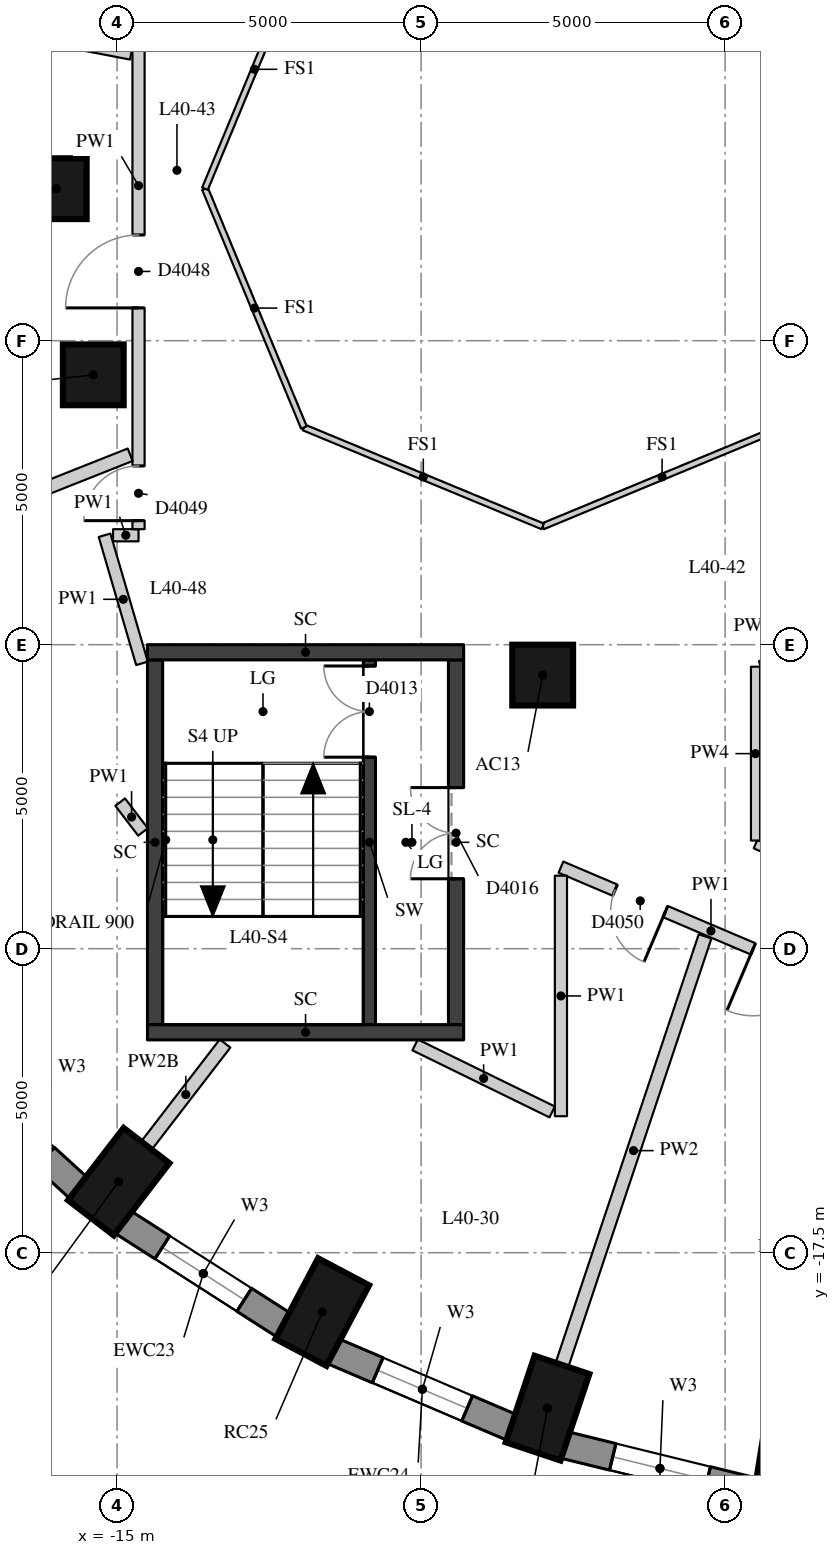
"""IFC4 building model, lengths in metres.
Left out: names, types, materials, properties, quantities, classifications, styles, units other than length and angle.
Written with IfcOpenShell. Run it as: python <this file> out.ifc"""

import sys

from ifc_helpers import new_model, si_unit, direction, frame, frame_2d, origin, origin_2d, place, context, subcontext, project, spatial, rectangle, extrude, element, fill, save


model = new_model("IFC4")
c1 = context("Model", 3, precision=1e-05, world=origin(), true_north=direction((0.0, 1.0)))
c2 = subcontext(c1, "Body", "Model", "MODEL_VIEW")
j1 = project(units=[si_unit("LENGTHUNIT", "METRE"), si_unit("PLANEANGLEUNIT", "RADIAN")], contexts=[c1])
p1 = place(None, origin())
s1 = spatial("IfcSite", under=j1, at=p1, CompositionType="ELEMENT")
p2 = place(p1, origin())
s2 = spatial("IfcBuilding", under=s1, at=p2, CompositionType="ELEMENT")
p3 = place(p2, frame((0.0, 0.0, 145.1)))
s3 = spatial("IfcBuildingStorey", under=s2, at=p3, CompositionType="ELEMENT", Elevation=145.1)
for number, where, z_axis, x_axis in (
    (1, (-14.973, -16.332, 0.0), (0.0, 0.0, 1.0), (-0.61, -0.792, 0.0)),
    (2, (-11.625, -18.476, 0.0), (0.0, 0.0, 1.0), (-0.468, -0.884, 0.0)),
    (3, (-7.92, -20.056, 0.0), (0.0, 0.0, 1.0), (-0.317, -0.949, 0.0)),
    (4, (-3.972, -21.024, 0.0), (0.0, 0.0, 1.0), (-0.16, -0.987, 0.0)),
):
    element("IfcColumn", number, at=place(p3, frame(where, z_axis=z_axis, x_axis=x_axis)), inside=s3, PredefinedType="COLUMN", context=c2, shape_type="SweptSolid", body=[
        extrude(rectangle(XDim=1.5, YDim=0.95, at=origin_2d()), origin(), (0.0, 0.0, 1.0), 3.3),
    ])
for number, where, z_axis, x_axis in (
    (5, (-16.0, 0.0, 0.0), (0.0, 0.0, 1.0), (1.0, 0.0, 0.0)),
    (6, (-15.391, -3.062, 0.0), (0.0, 0.0, 1.0), (1.0, 0.0, 0.0)),
    (7, (-8.0, -8.0, 0.0), (0.0, 0.0, 1.0), (1.0, 0.0, 0.0)),
):
    element("IfcColumn", number, at=place(p3, frame(where, z_axis=z_axis, x_axis=x_axis)), inside=s3, PredefinedType="COLUMN", context=c2, shape_type="SweptSolid", body=[
        extrude(rectangle(XDim=1.0, YDim=1.0, at=origin_2d()), origin(), (0.0, 0.0, 1.0), 3.3),
    ])
p4 = place(p3, frame((-17.913, -14.35, 0.0), z_axis=(0.0, 0.0, 1.0), x_axis=(0.737808755941, -0.675009807082, 0.0)))
e8 = element("IfcWall", 8, at=p4, inside=s3, PredefinedType="SOLIDWALL", context=c2, shape_type="SweptSolid", body=[
    extrude(rectangle(XDim=3.094, YDim=0.45, at=frame_2d((1.547, 0.0))), origin(), (0.0, 0.0, 1.0), 3.02),
])
p5 = place(p4, frame((0.747, 0.0, 0.4)))
e9 = element("IfcOpeningElement", 9, at=p5, cuts=e8, PredefinedType="OPENING", context=c2, shape_type="SweptSolid", body=[
    extrude(rectangle(XDim=1.6, YDim=1.75, at=frame_2d((0.8, 0.875))), frame((0.0, 0.235, 0.0), z_axis=(0.0, -1.0, 0.0), x_axis=(1.0, 0.0, 0.0)), (0.0, 0.0, 1.0), 0.47),
])
p6 = place(p3, frame((-14.908, -16.993, 0.0), z_axis=(0.0, 0.0, 1.0), x_axis=(0.842065914439, -0.539374633943, 0.0)))
e10 = element("IfcWall", 10, at=p6, inside=s3, PredefinedType="SOLIDWALL", context=c2, shape_type="SweptSolid", body=[
    extrude(rectangle(XDim=3.151, YDim=0.45, at=frame_2d((1.576, 0.0))), origin(), (0.0, 0.0, 1.0), 3.02),
])
p7 = place(p6, frame((0.776, 0.0, 0.4)))
e11 = element("IfcOpeningElement", 11, at=p7, cuts=e10, PredefinedType="OPENING", context=c2, shape_type="SweptSolid", body=[
    extrude(rectangle(XDim=1.6, YDim=1.75, at=frame_2d((0.8, 0.875))), frame((0.0, 0.235, 0.0), z_axis=(0.0, -1.0, 0.0), x_axis=(1.0, 0.0, 0.0)), (0.0, 0.0, 1.0), 0.47),
])
p8 = place(p3, frame((-11.45, -19.119, 0.0), z_axis=(0.0, 0.0, 1.0), x_axis=(0.919798725687, -0.392390499663, 0.0)))
e12 = element("IfcWall", 12, at=p8, inside=s3, PredefinedType="SOLIDWALL", context=c2, shape_type="SweptSolid", body=[
    extrude(rectangle(XDim=3.2, YDim=0.45, at=frame_2d((1.6, 0.0))), origin(), (0.0, 0.0, 1.0), 3.02),
])
p9 = place(p8, frame((0.8, 0.0, 0.4)))
e13 = element("IfcOpeningElement", 13, at=p9, cuts=e12, PredefinedType="OPENING", context=c2, shape_type="SweptSolid", body=[
    extrude(rectangle(XDim=1.6, YDim=1.75, at=frame_2d((0.8, 0.875))), frame((0.0, 0.235, 0.0), z_axis=(0.0, -1.0, 0.0), x_axis=(1.0, 0.0, 0.0)), (0.0, 0.0, 1.0), 0.47),
])
p10 = place(p3, frame((-7.643, -20.662, 0.0), z_axis=(0.0, 0.0, 1.0), x_axis=(0.971232901476, -0.238131583563, 0.0)))
e14 = element("IfcWall", 14, at=p10, inside=s3, PredefinedType="SOLIDWALL", context=c2, shape_type="SweptSolid", body=[
    extrude(rectangle(XDim=3.237, YDim=0.45, at=frame_2d((1.618, 0.0))), origin(), (0.0, 0.0, 1.0), 3.02),
])
p11 = place(p10, frame((0.818, 0.0, 0.4)))
e15 = element("IfcOpeningElement", 15, at=p11, cuts=e14, PredefinedType="OPENING", context=c2, shape_type="SweptSolid", body=[
    extrude(rectangle(XDim=1.6, YDim=1.75, at=frame_2d((0.8, 0.875))), frame((0.0, 0.235, 0.0), z_axis=(0.0, -1.0, 0.0), x_axis=(1.0, 0.0, 0.0)), (0.0, 0.0, 1.0), 0.47),
])
p12 = place(p3, frame((-10.85, -13.75, 0.0), z_axis=(0.0, 0.0, 1.0), x_axis=(0.0, 1.0, 0.0)))
e16 = element("IfcWall", 16, at=p12, inside=s3, PredefinedType="SHEAR", context=c2, shape_type="SweptSolid", body=[
    extrude(rectangle(XDim=6.0, YDim=0.2, at=frame_2d((3.0, 0.0))), origin(), (0.0, 0.0, 1.0), 3.02),
])
p13 = place(p12, frame((4.4, 0.0, 0.0)))
e17 = element("IfcOpeningElement", 17, at=p13, cuts=e16, PredefinedType="OPENING", context=c2, shape_type="SweptSolid", body=[
    extrude(rectangle(XDim=1.5, YDim=2.1, at=frame_2d((0.75, 1.05))), frame((0.0, 0.11, 0.0), z_axis=(0.0, -1.0, 0.0), x_axis=(1.0, 0.0, 0.0)), (0.0, 0.0, 1.0), 0.22),
])
p14 = place(p3, frame((-14.375, -13.75, -0.28), z_axis=(0.0, 0.0, 1.0), x_axis=(0.0, 1.0, 0.0)))
e18 = element("IfcWall", 18, at=p14, inside=s3, PredefinedType="SHEAR", context=c2, shape_type="SweptSolid", body=[
    extrude(rectangle(XDim=6.0, YDim=0.25, at=frame_2d((3.0, 0.0))), origin(), (0.0, 0.0, 1.0), 3.3),
])
p15 = place(p3, frame((-9.425, -13.75, -0.28), z_axis=(0.0, 0.0, 1.0), x_axis=(0.0, 1.0, 0.0)))
e19 = element("IfcWall", 19, at=p15, inside=s3, PredefinedType="SHEAR", context=c2, shape_type="SweptSolid", body=[
    extrude(rectangle(XDim=6.0, YDim=0.25, at=frame_2d((3.0, 0.0))), origin(), (0.0, 0.0, 1.0), 3.3),
])
p16 = place(p15, frame((2.4, 0.0, 0.28)))
e20 = element("IfcOpeningElement", 20, at=p16, cuts=e19, PredefinedType="OPENING", context=c2, shape_type="SweptSolid", body=[
    extrude(rectangle(XDim=1.5, YDim=2.1, at=frame_2d((0.75, 1.05))), frame((0.0, 0.135, 0.0), z_axis=(0.0, -1.0, 0.0), x_axis=(1.0, 0.0, 0.0)), (0.0, 0.0, 1.0), 0.27),
])
for number, where, z_axis, x_axis in (
    (21, (-14.5, -7.625, -0.28), (0.0, 0.0, 1.0), (1.0, 0.0, 0.0)),
    (22, (-14.5, -13.875, -0.28), (0.0, 0.0, 1.0), (1.0, 0.0, 0.0)),
):
    element("IfcWall", number, at=place(p3, frame(where, z_axis=z_axis, x_axis=x_axis)), inside=s3, PredefinedType="SHEAR", context=c2, shape_type="SweptSolid", body=[
        extrude(rectangle(XDim=5.2, YDim=0.25, at=frame_2d((2.6, 0.0))), origin(), (0.0, 0.0, 1.0), 3.3),
    ])
p17 = place(p3, frame((-2.766, -13.258, 0.0), z_axis=(0.0, 0.0, 1.0), x_axis=(-0.920210819037, 0.391423106787, 0.0)))
e23 = element("IfcWall", 23, at=p17, inside=s3, PredefinedType="PARTITIONING", context=c2, shape_type="SweptSolid", body=[
    extrude(rectangle(XDim=5.362, YDim=0.2, at=frame_2d((2.681, 0.0))), origin(), (0.0, 0.0, 1.0), 3.02),
])
p18 = place(p17, frame((3.495, 0.0, 0.0)))
e24 = element("IfcOpeningElement", 24, at=p18, cuts=e23, PredefinedType="OPENING", context=c2, shape_type="SweptSolid", body=[
    extrude(rectangle(XDim=0.9, YDim=2.1, at=frame_2d((0.45, 1.05))), frame((0.0, 0.11, 0.0), z_axis=(0.0, -1.0, 0.0), x_axis=(1.0, 0.0, 0.0)), (0.0, 0.0, 1.0), 0.22),
])
p19 = place(p17, frame((0.827, 0.0, 0.0)))
e25 = element("IfcOpeningElement", 25, at=p19, cuts=e23, PredefinedType="OPENING", context=c2, shape_type="SweptSolid", body=[
    extrude(rectangle(XDim=1.1, YDim=2.1, at=frame_2d((0.55, 1.05))), frame((0.0, 0.11, 0.0), z_axis=(0.0, -1.0, 0.0), x_axis=(1.0, 0.0, 0.0)), (0.0, 0.0, 1.0), 0.22),
])
p20 = place(p3, frame((-7.7, -11.299, 0.0), z_axis=(0.0, 0.0, 1.0), x_axis=(0.0, -1.0, 0.0)))
e26 = element("IfcWall", 26, at=p20, inside=s3, PredefinedType="PARTITIONING", context=c2, shape_type="SweptSolid", body=[
    extrude(rectangle(XDim=3.956, YDim=0.2, at=frame_2d((1.978, 0.0))), origin(), (0.0, 0.0, 1.0), 3.02),
])
p21 = place(p3, frame((-7.844, -15.185, 0.0), z_axis=(0.0, 0.0, 1.0), x_axis=(-0.898266579534, 0.439450966653, 0.0)))
e27 = element("IfcWall", 27, at=p21, inside=s3, PredefinedType="PARTITIONING", context=c2, shape_type="SweptSolid", body=[
    extrude(rectangle(XDim=2.509, YDim=0.2, at=frame_2d((1.254, 0.0))), origin(), (0.0, 0.0, 1.0), 3.02),
])
p22 = place(p3, frame((-14.574, -10.58, 0.0), z_axis=(0.0, 0.0, 1.0), x_axis=(-0.606745625174, 0.794896060081, 0.0)))
e28 = element("IfcWall", 28, at=p22, inside=s3, PredefinedType="PARTITIONING", context=c2, shape_type="SweptSolid", body=[
    extrude(rectangle(XDim=0.618, YDim=0.2, at=frame_2d((0.309, 0.0))), origin(), (0.0, 0.0, 1.0), 3.02),
])
p23 = place(p3, frame((-14.59, -7.807, 0.0), z_axis=(0.0, 0.0, 1.0), x_axis=(-0.280401457903, 0.959882817018, 0.0)))
e29 = element("IfcWall", 29, at=p23, inside=s3, PredefinedType="PARTITIONING", context=c2, shape_type="SweptSolid", body=[
    extrude(rectangle(XDim=2.195, YDim=0.2, at=frame_2d((1.098, 0.0))), origin(), (0.0, 0.0, 1.0), 3.02),
])
p24 = place(p3, frame((-15.065, -5.7, 0.0), z_axis=(0.0, 0.0, 1.0), x_axis=(1.0, 0.0, 0.0)))
e30 = element("IfcWall", 30, at=p24, inside=s3, PredefinedType="PARTITIONING", context=c2, shape_type="SweptSolid", body=[
    extrude(rectangle(XDim=0.419, YDim=0.2, at=frame_2d((0.209, 0.0))), origin(), (0.0, 0.0, 1.0), 3.02),
])
p25 = place(p3, frame((-14.647, -5.6, 0.0), z_axis=(0.0, 0.0, 1.0), x_axis=(0.0, 1.0, 0.0)))
e31 = element("IfcWall", 31, at=p25, inside=s3, PredefinedType="PARTITIONING", context=c2, shape_type="SweptSolid", body=[
    extrude(rectangle(XDim=11.3, YDim=0.2, at=frame_2d((5.65, 0.0))), origin(), (0.0, 0.0, 1.0), 3.02),
])
p26 = place(p25, frame((10.06, 0.0, 0.0)))
e32 = element("IfcOpeningElement", 32, at=p26, cuts=e31, PredefinedType="OPENING", context=c2, shape_type="SweptSolid", body=[
    extrude(rectangle(XDim=1.1, YDim=2.1, at=frame_2d((0.55, 1.05))), frame((0.0, 0.11, 0.0), z_axis=(0.0, -1.0, 0.0), x_axis=(1.0, 0.0, 0.0)), (0.0, 0.0, 1.0), 0.22),
])
p27 = place(p25, frame((3.639, 0.0, 0.0)))
e33 = element("IfcOpeningElement", 33, at=p27, cuts=e31, PredefinedType="OPENING", context=c2, shape_type="SweptSolid", body=[
    extrude(rectangle(XDim=1.2, YDim=2.1, at=frame_2d((0.6, 1.05))), frame((0.0, 0.11, 0.0), z_axis=(0.0, -1.0, 0.0), x_axis=(1.0, 0.0, 0.0)), (0.0, 0.0, 1.0), 0.22),
])
p28 = place(p25, frame((0.14, 0.0, 0.0)))
e34 = element("IfcOpeningElement", 34, at=p28, cuts=e31, PredefinedType="OPENING", context=c2, shape_type="SweptSolid", body=[
    extrude(rectangle(XDim=0.9, YDim=2.1, at=frame_2d((0.45, 1.05))), frame((0.0, 0.11, 0.0), z_axis=(0.0, -1.0, 0.0), x_axis=(1.0, 0.0, 0.0)), (0.0, 0.0, 1.0), 0.22),
])
p29 = place(p3, frame((-2.501, -11.631, 0.0), z_axis=(0.0, 0.0, 1.0), x_axis=(-0.920228720371, 0.391381019217, 0.0)))
e35 = element("IfcWall", 35, at=p29, inside=s3, PredefinedType="PARTITIONING", context=c2, shape_type="SweptSolid", body=[
    extrude(rectangle(XDim=2.172, YDim=0.15, at=frame_2d((1.086, 0.0))), origin(), (0.0, 0.0, 1.0), 3.02),
])
p30 = place(p3, frame((-4.5, -10.721, 0.0), z_axis=(0.0, 0.0, 1.0), x_axis=(0.0, 1.0, 0.0)))
e36 = element("IfcWall", 36, at=p30, inside=s3, PredefinedType="PARTITIONING", context=c2, shape_type="SweptSolid", body=[
    extrude(rectangle(XDim=2.859, YDim=0.15, at=frame_2d((1.43, 0.0))), origin(), (0.0, 0.0, 1.0), 3.02),
])
p31 = place(p3, frame((-4.423, -7.842, 0.0), z_axis=(0.0, 0.0, 1.0), x_axis=(0.965853333569, 0.259089440221, 0.0)))
e37 = element("IfcWall", 37, at=p31, inside=s3, PredefinedType="PARTITIONING", context=c2, shape_type="SweptSolid", body=[
    extrude(rectangle(XDim=0.852, YDim=0.15, at=frame_2d((0.426, 0.0))), origin(), (0.0, 0.0, 1.0), 3.02),
])
p32 = place(p3, frame((-20.932, 3.417, 0.0), z_axis=(0.0, 0.0, 1.0), x_axis=(0.982023362662, -0.188759410856, 0.0)))
e38 = element("IfcWall", 38, at=p32, inside=s3, PredefinedType="PARTITIONING", context=c2, shape_type="SweptSolid", body=[
    extrude(rectangle(XDim=6.278, YDim=0.22, at=frame_2d((3.139, 0.0))), origin(), (0.0, 0.0, 1.0), 2.57),
])
p33 = place(p3, frame((-19.99, -6.441, 0.0), z_axis=(0.0, 0.0, 1.0), x_axis=(0.929507316491, 0.368803672147, 0.0)))
e39 = element("IfcWall", 39, at=p33, inside=s3, PredefinedType="PARTITIONING", context=c2, shape_type="SweptSolid", body=[
    extrude(rectangle(XDim=5.6, YDim=0.22, at=frame_2d((2.8, 0.0))), origin(), (0.0, 0.0, 1.0), 3.02),
])
p34 = place(p3, frame((-14.516, -15.737, 0.0), z_axis=(0.0, 0.0, 1.0), x_axis=(0.609983624648, 0.792414019097, 0.0)))
e40 = element("IfcWall", 40, at=p34, inside=s3, PredefinedType="PARTITIONING", context=c2, shape_type="SweptSolid", body=[
    extrude(rectangle(XDim=2.118, YDim=0.22, at=frame_2d((1.059, 0.0))), origin(), (0.0, 0.0, 1.0), 2.57),
])
p35 = place(p3, frame((-7.683, -19.345, 0.0), z_axis=(0.0, 0.0, 1.0), x_axis=(0.316720596973, 0.948518878807, 0.0)))
e41 = element("IfcWall", 41, at=p35, inside=s3, PredefinedType="PARTITIONING", context=c2, shape_type="SweptSolid", body=[
    extrude(rectangle(XDim=7.43, YDim=0.22, at=frame_2d((3.715, 0.0))), origin(), (0.0, 0.0, 1.0), 3.02),
])
for number, where, z_axis, x_axis in (
    (42, (-4.073, -3.927, 0.0), (0.0, 0.0, 1.0), (-0.924, -0.383, 0.0)),
    (43, (-8.0, -5.554, 0.0), (0.0, 0.0, 1.0), (-0.924, 0.383, 0.0)),
    (44, (-11.927, -3.927, 0.0), (0.0, 0.0, 1.0), (-0.383, 0.924, 0.0)),
    (45, (-13.554, 0.0, 0.0), (0.0, 0.0, 1.0), (0.383, 0.924, 0.0)),
):
    element("IfcWall", number, at=place(p3, frame(where, z_axis=z_axis, x_axis=x_axis)), inside=s3, PredefinedType="PARTITIONING", context=c2, shape_type="SweptSolid", body=[
        extrude(rectangle(XDim=4.251, YDim=0.1, at=frame_2d((2.125, 0.0))), origin(), (0.0, 0.0, 1.0), 3.02),
    ])
p36 = place(p7, origin())
e46 = element("IfcWindow", 46, at=p36, inside=s3, PartitioningType="SINGLE_PANEL", PredefinedType="WINDOW", context=c2, shape_type="SweptSolid", body=[
    extrude(rectangle(XDim=1.6, YDim=1.75, at=frame_2d((0.8, 0.875))), frame((0.0, 0.035, 0.0), z_axis=(0.0, -1.0, 0.0), x_axis=(1.0, 0.0, 0.0)), (0.0, 0.0, 1.0), 0.06),
])
fill(e11, e46)
p37 = place(p9, origin())
e47 = element("IfcWindow", 47, at=p37, inside=s3, PartitioningType="SINGLE_PANEL", PredefinedType="WINDOW", context=c2, shape_type="SweptSolid", body=[
    extrude(rectangle(XDim=1.6, YDim=1.75, at=frame_2d((0.8, 0.875))), frame((0.0, 0.035, 0.0), z_axis=(0.0, -1.0, 0.0), x_axis=(1.0, 0.0, 0.0)), (0.0, 0.0, 1.0), 0.06),
])
fill(e13, e47)
p38 = place(p11, origin())
e48 = element("IfcWindow", 48, at=p38, inside=s3, PartitioningType="SINGLE_PANEL", PredefinedType="WINDOW", context=c2, shape_type="SweptSolid", body=[
    extrude(rectangle(XDim=1.6, YDim=1.75, at=frame_2d((0.8, 0.875))), frame((0.0, 0.035, 0.0), z_axis=(0.0, -1.0, 0.0), x_axis=(1.0, 0.0, 0.0)), (0.0, 0.0, 1.0), 0.06),
])
fill(e15, e48)
p39 = place(p13, origin())
e49 = element("IfcDoor", 49, at=p39, inside=s3, OperationType="DOUBLE_DOOR_SINGLE_SWING", PredefinedType="DOOR", context=c2, shape_type="SweptSolid", body=[
    extrude(rectangle(XDim=1.5, YDim=2.1, at=frame_2d((0.75, 1.05))), frame((0.0, 0.025, 0.0), z_axis=(0.0, -1.0, 0.0), x_axis=(1.0, 0.0, 0.0)), (0.0, 0.0, 1.0), 0.05),
])
fill(e17, e49)
p40 = place(p16, origin())
e50 = element("IfcDoor", 50, at=p40, inside=s3, OperationType="DOUBLE_DOOR_SINGLE_SWING", PredefinedType="DOOR", context=c2, shape_type="SweptSolid", body=[
    extrude(rectangle(XDim=1.5, YDim=2.1, at=frame_2d((0.75, 1.05))), frame((0.0, 0.025, 0.0), z_axis=(0.0, -1.0, 0.0), x_axis=(1.0, 0.0, 0.0)), (0.0, 0.0, 1.0), 0.05),
])
fill(e20, e50)
p41 = place(p27, origin())
e51 = element("IfcDoor", 51, at=p41, inside=s3, OperationType="SINGLE_SWING_LEFT", PredefinedType="DOOR", context=c2, shape_type="SweptSolid", body=[
    extrude(rectangle(XDim=1.2, YDim=2.1, at=frame_2d((0.6, 1.05))), frame((0.0, 0.025, 0.0), z_axis=(0.0, -1.0, 0.0), x_axis=(1.0, 0.0, 0.0)), (0.0, 0.0, 1.0), 0.05),
])
fill(e33, e51)
p42 = place(p28, origin())
e52 = element("IfcDoor", 52, at=p42, inside=s3, OperationType="SINGLE_SWING_LEFT", PredefinedType="DOOR", context=c2, shape_type="SweptSolid", body=[
    extrude(rectangle(XDim=0.9, YDim=2.1, at=frame_2d((0.45, 1.05))), frame((0.0, 0.025, 0.0), z_axis=(0.0, -1.0, 0.0), x_axis=(1.0, 0.0, 0.0)), (0.0, 0.0, 1.0), 0.05),
])
fill(e34, e52)
p43 = place(p18, origin())
e53 = element("IfcDoor", 53, at=p43, inside=s3, OperationType="SINGLE_SWING_LEFT", PredefinedType="DOOR", context=c2, shape_type="SweptSolid", body=[
    extrude(rectangle(XDim=0.9, YDim=2.1, at=frame_2d((0.45, 1.05))), frame((0.0, 0.025, 0.0), z_axis=(0.0, -1.0, 0.0), x_axis=(1.0, 0.0, 0.0)), (0.0, 0.0, 1.0), 0.05),
])
fill(e24, e53)
p44 = place(p19, origin())
e54 = element("IfcDoor", 54, at=p44, inside=s3, OperationType="SINGLE_SWING_RIGHT", PredefinedType="DOOR", context=c2, shape_type="SweptSolid", body=[
    extrude(rectangle(XDim=1.1, YDim=2.1, at=frame_2d((0.55, 1.05))), frame((0.0, 0.025, 0.0), z_axis=(0.0, -1.0, 0.0), x_axis=(1.0, 0.0, 0.0)), (0.0, 0.0, 1.0), 0.05),
])
fill(e25, e54)
save(model, sys.argv[1])
